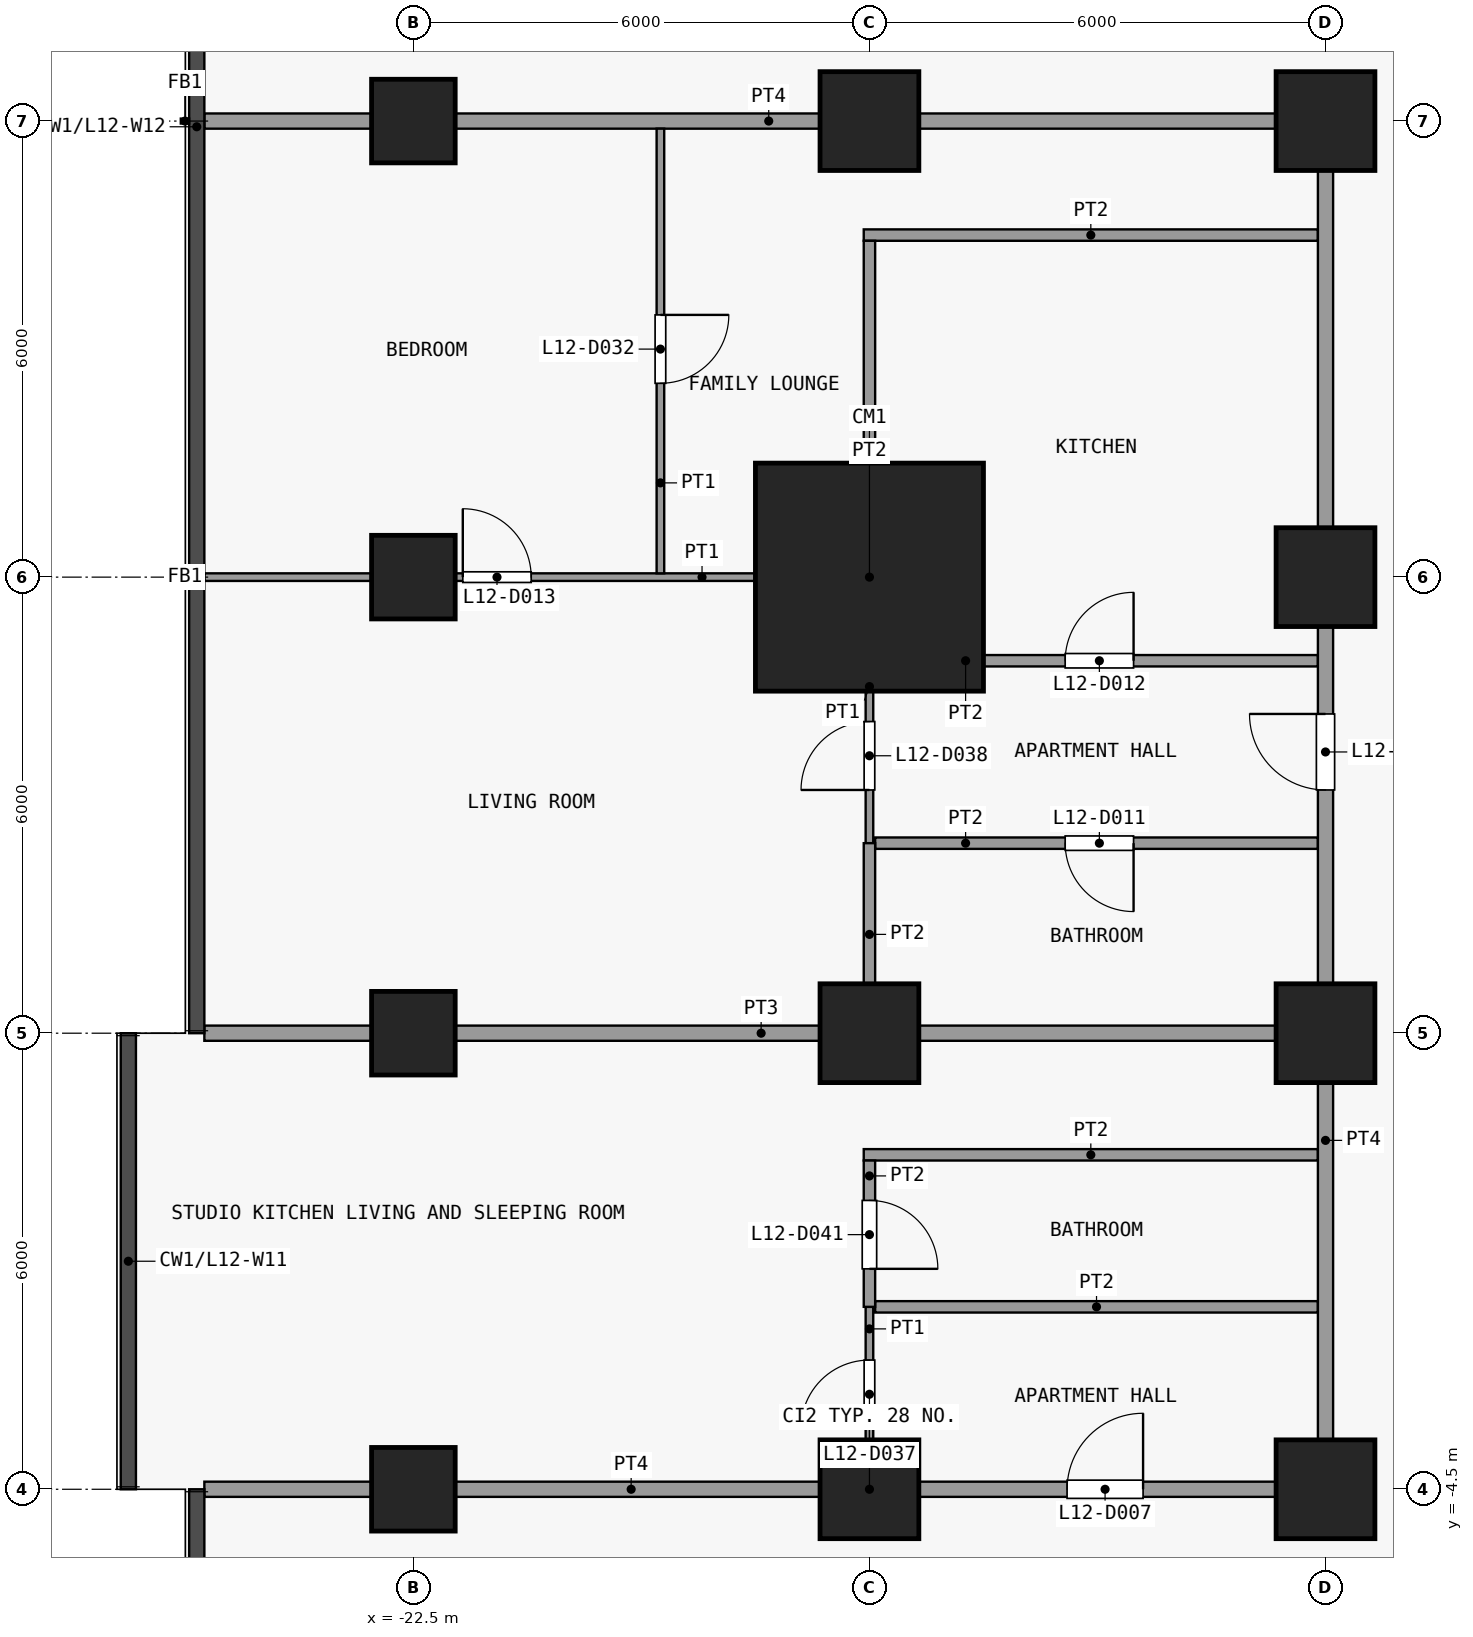
"""IFC4 building model, lengths in metres.
Left out: names, types, materials, properties, quantities, classifications, styles, units other than length and angle.
Written with IfcOpenShell. Run it as: python <this file> out.ifc"""

import sys

from ifc_helpers import new_model, si_unit, direction, frame, frame_2d, origin, origin_2d, place, context, subcontext, project, spatial, rectangle, extrude, element, fill, save


model = new_model("IFC4")
c1 = context("Model", 3, precision=1e-05, world=origin(), true_north=direction((0.0, 1.0)))
c2 = subcontext(c1, "Body", "Model", "MODEL_VIEW")
j1 = project(units=[si_unit("LENGTHUNIT", "METRE"), si_unit("PLANEANGLEUNIT", "RADIAN")], contexts=[c1])
p1 = place(None, origin())
s1 = spatial("IfcSite", under=j1, at=p1, CompositionType="ELEMENT")
p2 = place(p1, origin())
s2 = spatial("IfcBuilding", under=s1, at=p2, CompositionType="ELEMENT")
p3 = place(p2, frame((0.0, 0.0, 54.1)))
s3 = spatial("IfcBuildingStorey", under=s2, at=p3, CompositionType="ELEMENT", Elevation=54.1)
for number, where, z_axis, x_axis in (
    (1, (-22.5, -4.5, 0.0), (0.0, 0.0, 1.0), (1.0, 0.0, 0.0)),
    (2, (-22.5, 1.5, 0.0), (0.0, 0.0, 1.0), (1.0, 0.0, 0.0)),
    (3, (-22.5, 7.5, 0.0), (0.0, 0.0, 1.0), (1.0, 0.0, 0.0)),
    (4, (-22.5, 13.5, 0.0), (0.0, 0.0, 1.0), (1.0, 0.0, 0.0)),
):
    element("IfcColumn", number, at=place(p3, frame(where, z_axis=z_axis, x_axis=x_axis)), inside=s3, PredefinedType="COLUMN", context=c2, shape_type="SweptSolid", body=[
        extrude(rectangle(XDim=1.1, YDim=1.1, at=origin_2d()), origin(), (0.0, 0.0, 1.0), 3.6),
    ])
for number, where, z_axis, x_axis in (
    (5, (-16.5, -4.5, 0.0), (0.0, 0.0, 1.0), (1.0, 0.0, 0.0)),
    (6, (-16.5, 1.5, 0.0), (0.0, 0.0, 1.0), (1.0, 0.0, 0.0)),
):
    element("IfcColumn", number, at=place(p3, frame(where, z_axis=z_axis, x_axis=x_axis)), inside=s3, PredefinedType="COLUMN", context=c2, shape_type="SweptSolid", body=[
        extrude(rectangle(XDim=1.3, YDim=1.3, at=origin_2d()), origin(), (0.0, 0.0, 1.0), 3.6),
    ])
p4 = place(p3, frame((-16.5, 7.5, 0.0), z_axis=(0.0, 0.0, 1.0), x_axis=(1.0, 0.0, 0.0)))
e7 = element("IfcColumn", 7, at=p4, inside=s3, PredefinedType="COLUMN", context=c2, shape_type="SweptSolid", body=[
    extrude(rectangle(XDim=3.0, YDim=3.0, at=origin_2d()), origin(), (0.0, 0.0, 1.0), 3.6),
])
for number, where, z_axis, x_axis in (
    (8, (-16.5, 13.5, 0.0), (0.0, 0.0, 1.0), (1.0, 0.0, 0.0)),
    (9, (-10.5, -4.5, 0.0), (0.0, 0.0, 1.0), (1.0, 0.0, 0.0)),
    (10, (-10.5, 1.5, 0.0), (0.0, 0.0, 1.0), (1.0, 0.0, 0.0)),
    (11, (-10.5, 7.5, 0.0), (0.0, 0.0, 1.0), (1.0, 0.0, 0.0)),
    (12, (-10.5, 13.5, 0.0), (0.0, 0.0, 1.0), (1.0, 0.0, 0.0)),
):
    element("IfcColumn", number, at=place(p3, frame(where, z_axis=z_axis, x_axis=x_axis)), inside=s3, PredefinedType="COLUMN", context=c2, shape_type="SweptSolid", body=[
        extrude(rectangle(XDim=1.3, YDim=1.3, at=origin_2d()), origin(), (0.0, 0.0, 1.0), 3.6),
    ])
p5 = place(p3, frame((-25.25, -4.5, 0.0), z_axis=(0.0, 0.0, 1.0), x_axis=(1.0, 0.0, 0.0)))
e13 = element("IfcWall", 13, at=p5, inside=s3, PredefinedType="PARTITIONING", context=c2, shape_type="SweptSolid", body=[
    extrude(rectangle(XDim=14.85, YDim=0.2, at=frame_2d((7.425, 0.0))), origin(), (0.0, 0.0, 1.0), 3.3),
])
p6 = place(p5, frame((11.35, 0.0, 0.0)))
e14 = element("IfcOpeningElement", 14, at=p6, cuts=e13, PredefinedType="OPENING", context=c2, shape_type="SweptSolid", body=[
    extrude(rectangle(XDim=1.0, YDim=2.1, at=frame_2d((0.5, 1.05))), frame((0.0, 0.11, 0.0), z_axis=(0.0, -1.0, 0.0), x_axis=(1.0, 0.0, 0.0)), (0.0, 0.0, 1.0), 0.22),
])
p7 = place(p3, frame((-16.425, -2.1, 0.0), z_axis=(0.0, 0.0, 1.0), x_axis=(1.0, 0.0, 0.0)))
e15 = element("IfcWall", 15, at=p7, inside=s3, PredefinedType="PARTITIONING", context=c2, shape_type="SweptSolid", body=[
    extrude(rectangle(XDim=5.825, YDim=0.15, at=frame_2d((2.913, 0.0))), origin(), (0.0, 0.0, 1.0), 3.3),
])
p8 = place(p3, frame((-16.575, -0.1, 0.0), z_axis=(0.0, 0.0, 1.0), x_axis=(1.0, 0.0, 0.0)))
e16 = element("IfcWall", 16, at=p8, inside=s3, PredefinedType="PARTITIONING", context=c2, shape_type="SweptSolid", body=[
    extrude(rectangle(XDim=5.975, YDim=0.15, at=frame_2d((2.987, 0.0))), origin(), (0.0, 0.0, 1.0), 3.3),
])
p9 = place(p3, frame((-25.25, 1.5, 0.0), z_axis=(0.0, 0.0, 1.0), x_axis=(1.0, 0.0, 0.0)))
e17 = element("IfcWall", 17, at=p9, inside=s3, PredefinedType="PARTITIONING", context=c2, shape_type="SweptSolid", body=[
    extrude(rectangle(XDim=14.65, YDim=0.2, at=frame_2d((7.325, 0.0))), origin(), (0.0, 0.0, 1.0), 3.3),
])
p10 = place(p3, frame((-16.425, 4.0, 0.0), z_axis=(0.0, 0.0, 1.0), x_axis=(1.0, 0.0, 0.0)))
e18 = element("IfcWall", 18, at=p10, inside=s3, PredefinedType="PARTITIONING", context=c2, shape_type="SweptSolid", body=[
    extrude(rectangle(XDim=5.825, YDim=0.15, at=frame_2d((2.913, 0.0))), origin(), (0.0, 0.0, 1.0), 3.3),
])
p11 = place(p10, frame((2.5, 0.0, 0.0)))
e19 = element("IfcOpeningElement", 19, at=p11, cuts=e18, PredefinedType="OPENING", context=c2, shape_type="SweptSolid", body=[
    extrude(rectangle(XDim=0.9, YDim=2.1, at=frame_2d((0.45, 1.05))), frame((0.0, 0.085, 0.0), z_axis=(0.0, -1.0, 0.0), x_axis=(1.0, 0.0, 0.0)), (0.0, 0.0, 1.0), 0.17),
])
p12 = place(p3, frame((-16.425, 6.4, 0.0), z_axis=(0.0, 0.0, 1.0), x_axis=(1.0, 0.0, 0.0)))
e20 = element("IfcWall", 20, at=p12, inside=s3, PredefinedType="PARTITIONING", context=c2, shape_type="SweptSolid", body=[
    extrude(rectangle(XDim=5.825, YDim=0.15, at=frame_2d((2.913, 0.0))), origin(), (0.0, 0.0, 1.0), 3.3),
])
p13 = place(p12, frame((2.5, 0.0, 0.0)))
e21 = element("IfcOpeningElement", 21, at=p13, cuts=e20, PredefinedType="OPENING", context=c2, shape_type="SweptSolid", body=[
    extrude(rectangle(XDim=0.9, YDim=2.1, at=frame_2d((0.45, 1.05))), frame((0.0, 0.085, 0.0), z_axis=(0.0, -1.0, 0.0), x_axis=(1.0, 0.0, 0.0)), (0.0, 0.0, 1.0), 0.17),
])
p14 = place(p3, frame((-25.25, 7.5, 0.0), z_axis=(0.0, 0.0, 1.0), x_axis=(1.0, 0.0, 0.0)))
e22 = element("IfcWall", 22, at=p14, inside=s3, PredefinedType="PARTITIONING", context=c2, shape_type="SweptSolid", body=[
    extrude(rectangle(XDim=8.675, YDim=0.1, at=frame_2d((4.337, 0.0))), origin(), (0.0, 0.0, 1.0), 3.3),
])
p15 = place(p14, frame((3.4, 0.0, 0.0)))
e23 = element("IfcOpeningElement", 23, at=p15, cuts=e22, PredefinedType="OPENING", context=c2, shape_type="SweptSolid", body=[
    extrude(rectangle(XDim=0.9, YDim=2.1, at=frame_2d((0.45, 1.05))), frame((0.0, 0.06, 0.0), z_axis=(0.0, -1.0, 0.0), x_axis=(1.0, 0.0, 0.0)), (0.0, 0.0, 1.0), 0.12),
])
p16 = place(p3, frame((-16.575, 12.0, 0.0), z_axis=(0.0, 0.0, 1.0), x_axis=(1.0, 0.0, 0.0)))
e24 = element("IfcWall", 24, at=p16, inside=s3, PredefinedType="PARTITIONING", context=c2, shape_type="SweptSolid", body=[
    extrude(rectangle(XDim=5.975, YDim=0.15, at=frame_2d((2.987, 0.0))), origin(), (0.0, 0.0, 1.0), 3.3),
])
p17 = place(p3, frame((-25.25, 13.5, 0.0), z_axis=(0.0, 0.0, 1.0), x_axis=(1.0, 0.0, 0.0)))
e25 = element("IfcWall", 25, at=p17, inside=s3, PredefinedType="PARTITIONING", context=c2, shape_type="SweptSolid", body=[
    extrude(rectangle(XDim=14.85, YDim=0.2, at=frame_2d((7.425, 0.0))), origin(), (0.0, 0.0, 1.0), 3.3),
])
p18 = place(p3, frame((-19.25, 7.55, 0.0), z_axis=(0.0, 0.0, 1.0), x_axis=(0.0, 1.0, 0.0)))
e26 = element("IfcWall", 26, at=p18, inside=s3, PredefinedType="PARTITIONING", context=c2, shape_type="SweptSolid", body=[
    extrude(rectangle(XDim=5.85, YDim=0.1, at=frame_2d((2.925, 0.0))), origin(), (0.0, 0.0, 1.0), 3.3),
])
p19 = place(p18, frame((2.5, 0.0, 0.0)))
e27 = element("IfcOpeningElement", 27, at=p19, cuts=e26, PredefinedType="OPENING", context=c2, shape_type="SweptSolid", body=[
    extrude(rectangle(XDim=0.9, YDim=2.1, at=frame_2d((0.45, 1.05))), frame((0.0, 0.06, 0.0), z_axis=(0.0, -1.0, 0.0), x_axis=(1.0, 0.0, 0.0)), (0.0, 0.0, 1.0), 0.12),
])
p20 = place(p3, frame((-16.5, -4.4, 0.0), z_axis=(0.0, 0.0, 1.0), x_axis=(0.0, 1.0, 0.0)))
e28 = element("IfcWall", 28, at=p20, inside=s3, PredefinedType="PARTITIONING", context=c2, shape_type="SweptSolid", body=[
    extrude(rectangle(XDim=2.3, YDim=0.1, at=frame_2d((1.15, 0.0))), origin(), (0.0, 0.0, 1.0), 3.3),
])
p21 = place(p20, frame((0.7, 0.0, 0.0)))
e29 = element("IfcOpeningElement", 29, at=p21, cuts=e28, PredefinedType="OPENING", context=c2, shape_type="SweptSolid", body=[
    extrude(rectangle(XDim=0.9, YDim=2.1, at=frame_2d((0.45, 1.05))), frame((0.0, 0.06, 0.0), z_axis=(0.0, -1.0, 0.0), x_axis=(1.0, 0.0, 0.0)), (0.0, 0.0, 1.0), 0.12),
])
p22 = place(p3, frame((-16.5, 4.0, 0.0), z_axis=(0.0, 0.0, 1.0), x_axis=(0.0, 1.0, 0.0)))
e30 = element("IfcWall", 30, at=p22, inside=s3, PredefinedType="PARTITIONING", context=c2, shape_type="SweptSolid", body=[
    extrude(rectangle(XDim=2.4, YDim=0.1, at=frame_2d((1.2, 0.0))), origin(), (0.0, 0.0, 1.0), 3.3),
])
p23 = place(p22, frame((0.7, 0.0, 0.0)))
e31 = element("IfcOpeningElement", 31, at=p23, cuts=e30, PredefinedType="OPENING", context=c2, shape_type="SweptSolid", body=[
    extrude(rectangle(XDim=0.9, YDim=2.1, at=frame_2d((0.45, 1.05))), frame((0.0, 0.06, 0.0), z_axis=(0.0, -1.0, 0.0), x_axis=(1.0, 0.0, 0.0)), (0.0, 0.0, 1.0), 0.12),
])
p24 = place(p3, frame((-16.5, -2.1, 0.0), z_axis=(0.0, 0.0, 1.0), x_axis=(0.0, 1.0, 0.0)))
e32 = element("IfcWall", 32, at=p24, inside=s3, PredefinedType="PARTITIONING", context=c2, shape_type="SweptSolid", body=[
    extrude(rectangle(XDim=1.925, YDim=0.15, at=frame_2d((0.962, 0.0))), origin(), (0.0, 0.0, 1.0), 3.3),
])
p25 = place(p24, frame((0.5, 0.0, 0.0)))
e33 = element("IfcOpeningElement", 33, at=p25, cuts=e32, PredefinedType="OPENING", context=c2, shape_type="SweptSolid", body=[
    extrude(rectangle(XDim=0.9, YDim=2.1, at=frame_2d((0.45, 1.05))), frame((0.0, 0.085, 0.0), z_axis=(0.0, -1.0, 0.0), x_axis=(1.0, 0.0, 0.0)), (0.0, 0.0, 1.0), 0.17),
])
p26 = place(p3, frame((-16.5, 1.6, 0.0), z_axis=(0.0, 0.0, 1.0), x_axis=(0.0, 1.0, 0.0)))
e34 = element("IfcWall", 34, at=p26, inside=s3, PredefinedType="PARTITIONING", context=c2, shape_type="SweptSolid", body=[
    extrude(rectangle(XDim=2.4, YDim=0.15, at=frame_2d((1.2, 0.0))), origin(), (0.0, 0.0, 1.0), 3.3),
])
p27 = place(p3, frame((-16.5, 6.4, 0.0), z_axis=(0.0, 0.0, 1.0), x_axis=(0.0, 1.0, 0.0)))
e35 = element("IfcWall", 35, at=p27, inside=s3, PredefinedType="PARTITIONING", context=c2, shape_type="SweptSolid", body=[
    extrude(rectangle(XDim=5.525, YDim=0.15, at=frame_2d((2.763, 0.0))), origin(), (0.0, 0.0, 1.0), 3.3),
])
p28 = place(p3, frame((-10.5, -4.4, 0.0), z_axis=(0.0, 0.0, 1.0), x_axis=(0.0, 1.0, 0.0)))
e36 = element("IfcWall", 36, at=p28, inside=s3, PredefinedType="PARTITIONING", context=c2, shape_type="SweptSolid", body=[
    extrude(rectangle(XDim=17.8, YDim=0.2, at=frame_2d((8.9, 0.0))), origin(), (0.0, 0.0, 1.0), 3.3),
])
p29 = place(p28, frame((9.1, 0.0, 0.0)))
e37 = element("IfcOpeningElement", 37, at=p29, cuts=e36, PredefinedType="OPENING", context=c2, shape_type="SweptSolid", body=[
    extrude(rectangle(XDim=1.0, YDim=2.1, at=frame_2d((0.5, 1.05))), frame((0.0, 0.11, 0.0), z_axis=(0.0, -1.0, 0.0), x_axis=(1.0, 0.0, 0.0)), (0.0, 0.0, 1.0), 0.22),
])
p30 = place(p6, origin())
e38 = element("IfcDoor", 38, at=p30, inside=s3, OperationType="SINGLE_SWING_LEFT", PredefinedType="DOOR", context=c2, shape_type="SweptSolid", body=[
    extrude(rectangle(XDim=1.0, YDim=2.1, at=frame_2d((0.5, 1.05))), frame((0.0, 0.025, 0.0), z_axis=(0.0, -1.0, 0.0), x_axis=(1.0, 0.0, 0.0)), (0.0, 0.0, 1.0), 0.05),
])
fill(e14, e38)
p31 = place(p11, origin())
e39 = element("IfcDoor", 39, at=p31, inside=s3, OperationType="SINGLE_SWING_RIGHT", PredefinedType="DOOR", context=c2, shape_type="SweptSolid", body=[
    extrude(rectangle(XDim=0.9, YDim=2.1, at=frame_2d((0.45, 1.05))), frame((0.0, 0.025, 0.0), z_axis=(0.0, -1.0, 0.0), x_axis=(1.0, 0.0, 0.0)), (0.0, 0.0, 1.0), 0.05),
])
fill(e19, e39)
p32 = place(p13, origin())
e40 = element("IfcDoor", 40, at=p32, inside=s3, OperationType="SINGLE_SWING_LEFT", PredefinedType="DOOR", context=c2, shape_type="SweptSolid", body=[
    extrude(rectangle(XDim=0.9, YDim=2.1, at=frame_2d((0.45, 1.05))), frame((0.0, 0.025, 0.0), z_axis=(0.0, -1.0, 0.0), x_axis=(1.0, 0.0, 0.0)), (0.0, 0.0, 1.0), 0.05),
])
fill(e21, e40)
p33 = place(p15, origin())
e41 = element("IfcDoor", 41, at=p33, inside=s3, OperationType="SINGLE_SWING_RIGHT", PredefinedType="DOOR", context=c2, shape_type="SweptSolid", body=[
    extrude(rectangle(XDim=0.9, YDim=2.1, at=frame_2d((0.45, 1.05))), frame((0.0, 0.025, 0.0), z_axis=(0.0, -1.0, 0.0), x_axis=(1.0, 0.0, 0.0)), (0.0, 0.0, 1.0), 0.05),
])
fill(e23, e41)
p34 = place(p19, origin())
e42 = element("IfcDoor", 42, at=p34, inside=s3, OperationType="SINGLE_SWING_RIGHT", PredefinedType="DOOR", context=c2, shape_type="SweptSolid", body=[
    extrude(rectangle(XDim=0.9, YDim=2.1, at=frame_2d((0.45, 1.05))), frame((0.0, 0.025, 0.0), z_axis=(0.0, -1.0, 0.0), x_axis=(1.0, 0.0, 0.0)), (0.0, 0.0, 1.0), 0.05),
])
fill(e27, e42)
p35 = place(p21, origin())
e43 = element("IfcDoor", 43, at=p35, inside=s3, OperationType="SINGLE_SWING_RIGHT", PredefinedType="DOOR", context=c2, shape_type="SweptSolid", body=[
    extrude(rectangle(XDim=0.9, YDim=2.1, at=frame_2d((0.45, 1.05))), frame((0.0, 0.025, 0.0), z_axis=(0.0, -1.0, 0.0), x_axis=(1.0, 0.0, 0.0)), (0.0, 0.0, 1.0), 0.05),
])
fill(e29, e43)
p36 = place(p23, origin())
e44 = element("IfcDoor", 44, at=p36, inside=s3, OperationType="SINGLE_SWING_RIGHT", PredefinedType="DOOR", context=c2, shape_type="SweptSolid", body=[
    extrude(rectangle(XDim=0.9, YDim=2.1, at=frame_2d((0.45, 1.05))), frame((0.0, 0.025, 0.0), z_axis=(0.0, -1.0, 0.0), x_axis=(1.0, 0.0, 0.0)), (0.0, 0.0, 1.0), 0.05),
])
fill(e31, e44)
p37 = place(p25, origin())
e45 = element("IfcDoor", 45, at=p37, inside=s3, OperationType="SINGLE_SWING_LEFT", PredefinedType="DOOR", context=c2, shape_type="SweptSolid", body=[
    extrude(rectangle(XDim=0.9, YDim=2.1, at=frame_2d((0.45, 1.05))), frame((0.0, 0.025, 0.0), z_axis=(0.0, -1.0, 0.0), x_axis=(1.0, 0.0, 0.0)), (0.0, 0.0, 1.0), 0.05),
])
fill(e33, e45)
p38 = place(p29, origin())
e46 = element("IfcDoor", 46, at=p38, inside=s3, OperationType="SINGLE_SWING_LEFT", PredefinedType="DOOR", context=c2, shape_type="SweptSolid", body=[
    extrude(rectangle(XDim=1.0, YDim=2.1, at=frame_2d((0.5, 1.05))), frame((0.0, 0.025, 0.0), z_axis=(0.0, -1.0, 0.0), x_axis=(1.0, 0.0, 0.0)), (0.0, 0.0, 1.0), 0.05),
])
fill(e37, e46)
save(model, sys.argv[1])
